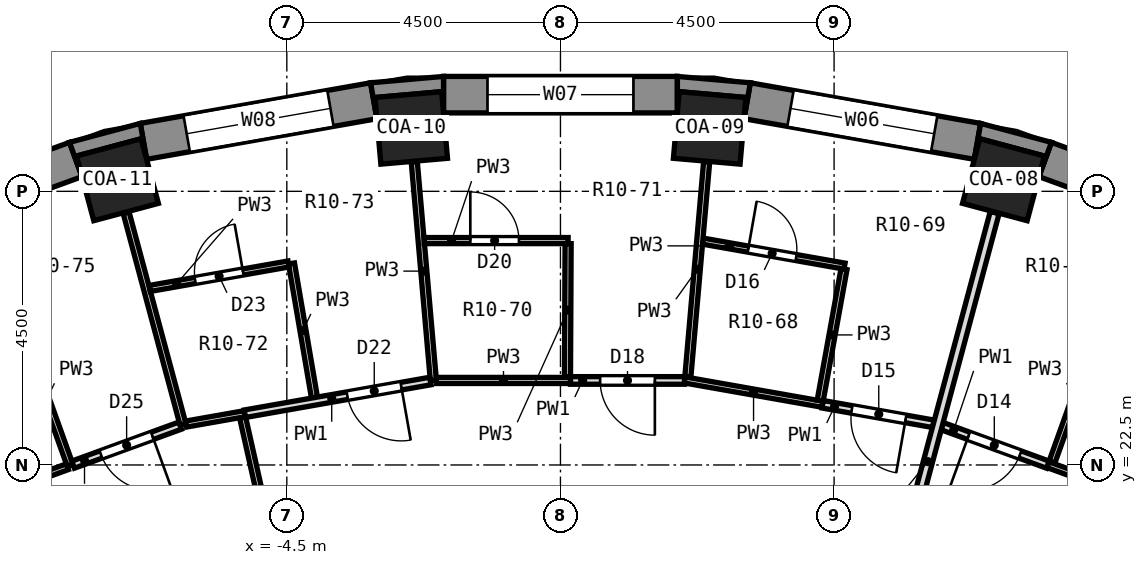
"""IFC4 building model, lengths in metres.
Left out: names, types, materials, properties, quantities, classifications, styles, units other than length and angle.
Written with IfcOpenShell. Run it as: python <this file> out.ifc"""

import sys

from ifc_helpers import new_model, si_unit, direction, frame, frame_2d, origin, origin_2d, place, context, subcontext, project, spatial, polyline, rectangle, outline, extrude, element, fill, save


model = new_model("IFC4")
c1 = context("Model", 3, precision=1e-05, world=origin(), true_north=direction((0.0, 1.0)))
c2 = subcontext(c1, "Body", "Model", "MODEL_VIEW")
j1 = project(units=[si_unit("LENGTHUNIT", "METRE"), si_unit("PLANEANGLEUNIT", "RADIAN")], contexts=[c1])
p1 = place(None, origin())
s1 = spatial("IfcSite", under=j1, at=p1, CompositionType="ELEMENT")
p2 = place(p1, origin())
s2 = spatial("IfcBuilding", under=s1, at=p2, CompositionType="ELEMENT")
p3 = place(p2, frame((0.0, 0.0, 36.2)))
s3 = spatial("IfcBuildingStorey", under=s2, at=p3, CompositionType="ELEMENT", Elevation=36.2)
for number, where, z_axis, x_axis in (
    (1, (7.286, 27.191, 0.0), (0.0, 0.0, 1.0), (0.259, 0.966, 0.0)),
    (2, (2.453, 28.043, 0.0), (0.0, 0.0, 1.0), (0.087, 0.996, 0.0)),
    (3, (-2.453, 28.043, 0.0), (0.0, 0.0, 1.0), (-0.087, 0.996, 0.0)),
    (4, (-7.286, 27.191, 0.0), (0.0, 0.0, 1.0), (-0.259, 0.966, 0.0)),
):
    element("IfcColumn", number, at=place(p3, frame(where, z_axis=z_axis, x_axis=x_axis)), inside=s3, PredefinedType="COLUMN", context=c2, shape_type="SweptSolid", body=[
        extrude(rectangle(XDim=1.1, YDim=1.1, at=origin_2d()), origin(), (0.0, 0.0, 1.0), 3.3),
    ])
p4 = place(p3, frame((11.585, 26.208, 0.0), z_axis=(0.0, 0.0, 1.0), x_axis=(-0.939689588564, 0.342028474173, 0.0)))
e5 = element("IfcWall", 5, at=p4, inside=s3, PredefinedType="SOLIDWALL", context=c2, shape_type="SweptSolid", body=[
    extrude(rectangle(XDim=3.846, YDim=0.6, at=frame_2d((1.923, 0.0))), origin(), (0.0, 0.0, 1.0), 2.75),
])
p5 = place(p4, frame((0.723, 0.0, 0.9)))
e6 = element("IfcOpeningElement", 6, at=p5, cuts=e5, PredefinedType="OPENING", context=c2, shape_type="SweptSolid", body=[
    extrude(rectangle(XDim=2.4, YDim=1.8, at=frame_2d((1.2, 0.9))), frame((0.0, 0.312, 0.0), z_axis=(0.0, -1.0, 0.0), x_axis=(1.0, 0.0, 0.0)), (0.0, 0.0, 1.0), 0.624),
])
p6 = place(p3, frame((6.858, 27.821, 0.0), z_axis=(0.0, 0.0, 1.0), x_axis=(-0.984800809218, 0.173687553279, 0.0)))
e7 = element("IfcWall", 7, at=p6, inside=s3, PredefinedType="SOLIDWALL", context=c2, shape_type="SweptSolid", body=[
    extrude(rectangle(XDim=3.846, YDim=0.6, at=frame_2d((1.923, 0.0))), origin(), (0.0, 0.0, 1.0), 2.75),
])
p7 = place(p6, frame((0.723, 0.0, 0.9)))
e8 = element("IfcOpeningElement", 8, at=p7, cuts=e7, PredefinedType="OPENING", context=c2, shape_type="SweptSolid", body=[
    extrude(rectangle(XDim=2.4, YDim=1.8, at=frame_2d((1.2, 0.9))), frame((0.0, 0.312, 0.0), z_axis=(0.0, -1.0, 0.0), x_axis=(1.0, 0.0, 0.0)), (0.0, 0.0, 1.0), 0.624),
])
p8 = place(p3, frame((1.923, 28.59, 0.0), z_axis=(0.0, 0.0, 1.0), x_axis=(-1.0, 0.0, 0.0)))
e9 = element("IfcWall", 9, at=p8, inside=s3, PredefinedType="SOLIDWALL", context=c2, shape_type="SweptSolid", body=[
    extrude(rectangle(XDim=3.846, YDim=0.6, at=frame_2d((1.923, 0.0))), origin(), (0.0, 0.0, 1.0), 2.75),
])
p9 = place(p8, frame((0.723, 0.0, 0.9)))
e10 = element("IfcOpeningElement", 10, at=p9, cuts=e9, PredefinedType="OPENING", context=c2, shape_type="SweptSolid", body=[
    extrude(rectangle(XDim=2.4, YDim=1.8, at=frame_2d((1.2, 0.9))), frame((0.0, 0.312, 0.0), z_axis=(0.0, -1.0, 0.0), x_axis=(1.0, 0.0, 0.0)), (0.0, 0.0, 1.0), 0.624),
])
p10 = place(p3, frame((-3.071, 28.489, 0.0), z_axis=(0.0, 0.0, 1.0), x_axis=(-0.984800809218, -0.173687553279, 0.0)))
e11 = element("IfcWall", 11, at=p10, inside=s3, PredefinedType="SOLIDWALL", context=c2, shape_type="SweptSolid", body=[
    extrude(rectangle(XDim=3.846, YDim=0.6, at=frame_2d((1.923, 0.0))), origin(), (0.0, 0.0, 1.0), 2.75),
])
p11 = place(p10, frame((0.723, 0.0, 0.9)))
e12 = element("IfcOpeningElement", 12, at=p11, cuts=e11, PredefinedType="OPENING", context=c2, shape_type="SweptSolid", body=[
    extrude(rectangle(XDim=2.4, YDim=1.8, at=frame_2d((1.2, 0.9))), frame((0.0, 0.312, 0.0), z_axis=(0.0, -1.0, 0.0), x_axis=(1.0, 0.0, 0.0)), (0.0, 0.0, 1.0), 0.624),
])
p12 = place(p3, frame((-7.971, 27.523, 0.0), z_axis=(0.0, 0.0, 1.0), x_axis=(-0.939689588564, -0.342028474173, 0.0)))
e13 = element("IfcWall", 13, at=p12, inside=s3, PredefinedType="SOLIDWALL", context=c2, shape_type="SweptSolid", body=[
    extrude(rectangle(XDim=3.846, YDim=0.6, at=frame_2d((1.923, 0.0))), origin(), (0.0, 0.0, 1.0), 2.75),
])
p13 = place(p12, frame((0.723, 0.0, 0.9)))
e14 = element("IfcOpeningElement", 14, at=p13, cuts=e13, PredefinedType="OPENING", context=c2, shape_type="SweptSolid", body=[
    extrude(rectangle(XDim=2.4, YDim=1.8, at=frame_2d((1.2, 0.9))), frame((0.0, 0.312, 0.0), z_axis=(0.0, -1.0, 0.0), x_axis=(1.0, 0.0, 0.0)), (0.0, 0.0, 1.0), 0.624),
])
p14 = place(p3, origin())
e15 = element("IfcWall", 15, at=p14, inside=s3, PredefinedType="SOLIDWALL", context=c2, shape_type="SweptSolid", body=[
    extrude(outline(polyline([(6.91, 28.117), (6.806, 27.526), (6.897, 27.865), (7.959, 27.58), (7.869, 27.241), (8.074, 27.805), (6.91, 28.117)])), origin(), (0.0, 0.0, 1.0), 2.75),
])
p15 = place(p3, origin())
e16 = element("IfcWall", 16, at=p15, inside=s3, PredefinedType="SOLIDWALL", context=c2, shape_type="SweptSolid", body=[
    extrude(outline(polyline([(3.123, 28.785), (1.923, 28.89), (1.923, 28.29), (1.954, 28.639), (3.049, 28.543), (3.019, 28.194), (3.123, 28.785)])), origin(), (0.0, 0.0, 1.0), 2.75),
])
p16 = place(p3, origin())
e17 = element("IfcWall", 17, at=p16, inside=s3, PredefinedType="SOLIDWALL", context=c2, shape_type="SweptSolid", body=[
    extrude(outline(polyline([(-1.923, 28.89), (-3.123, 28.785), (-3.019, 28.194), (-3.049, 28.543), (-1.954, 28.639), (-1.923, 28.29), (-1.923, 28.89)])), origin(), (0.0, 0.0, 1.0), 2.75),
])
p17 = place(p3, origin())
e18 = element("IfcWall", 18, at=p17, inside=s3, PredefinedType="SOLIDWALL", context=c2, shape_type="SweptSolid", body=[
    extrude(outline(polyline([(-6.91, 28.117), (-8.074, 27.805), (-7.869, 27.241), (-7.959, 27.58), (-6.897, 27.865), (-6.806, 27.526), (-6.91, 28.117)])), origin(), (0.0, 0.0, 1.0), 2.75),
])
p18 = place(p3, frame((-2.404, 27.485, 0.0), z_axis=(0.0, 0.0, 1.0), x_axis=(0.08706456859, -0.996202670593, 0.0)))
e19 = element("IfcWall", 19, at=p18, inside=s3, PredefinedType="PARTITIONING", context=c2, shape_type="SweptSolid", body=[
    extrude(rectangle(XDim=3.609, YDim=0.1, at=frame_2d((1.804, 0.0))), origin(), (0.0, 0.0, 1.0), 2.75),
])
p19 = place(p3, frame((-4.423, 25.814, 0.0), z_axis=(0.0, 0.0, 1.0), x_axis=(0.168697286213, -0.985667908387, 0.0)))
e20 = element("IfcWall", 20, at=p19, inside=s3, PredefinedType="PARTITIONING", context=c2, shape_type="SweptSolid", body=[
    extrude(rectangle(XDim=2.237, YDim=0.1, at=frame_2d((1.119, 0.0))), origin(), (0.0, 0.0, 1.0), 2.75),
])
p20 = place(p3, frame((-5.228, 23.285, 0.0), z_axis=(0.0, 0.0, 1.0), x_axis=(0.219089188196, -0.975704836319, 0.0)))
e21 = element("IfcWall", 21, at=p20, inside=s3, PredefinedType="PARTITIONING", context=c2, shape_type="SweptSolid", body=[
    extrude(rectangle(XDim=4.944, YDim=0.1, at=frame_2d((2.472, 0.0))), origin(), (0.0, 0.0, 1.0), 2.75),
])
p21 = place(p20, frame((2.028, 0.0, 0.0)))
e22 = element("IfcOpeningElement", 22, at=p21, cuts=e21, PredefinedType="OPENING", context=c2, shape_type="SweptSolid", body=[
    extrude(rectangle(XDim=0.9, YDim=2.1, at=frame_2d((0.45, 1.05))), frame((0.0, 0.062, 0.0), z_axis=(0.0, -1.0, 0.0), x_axis=(1.0, 0.0, 0.0)), (0.0, 0.0, 1.0), 0.124),
])
p22 = place(p3, frame((-7.143, 26.649, 0.0), z_axis=(0.0, 0.0, 1.0), x_axis=(0.259371754041, -0.965777558864, 0.0)))
e23 = element("IfcWall", 23, at=p22, inside=s3, PredefinedType="PARTITIONING", context=c2, shape_type="SweptSolid", body=[
    extrude(rectangle(XDim=3.609, YDim=0.1, at=frame_2d((1.804, 0.0))), origin(), (0.0, 0.0, 1.0), 2.75),
])
p23 = place(p3, frame((-8.839, 24.653, 0.0), z_axis=(0.0, 0.0, 1.0), x_axis=(0.337828591949, -0.941207651085, 0.0)))
e24 = element("IfcWall", 24, at=p23, inside=s3, PredefinedType="PARTITIONING", context=c2, shape_type="SweptSolid", body=[
    extrude(rectangle(XDim=2.3, YDim=0.1, at=frame_2d((1.15, 0.0))), origin(), (0.0, 0.0, 1.0), 2.75),
])
p24 = place(p3, frame((-11.659, 25.006, 0.0), z_axis=(0.0, 0.0, 1.0), x_axis=(0.422264101424, -0.906472850475, 0.0)))
e25 = element("IfcWall", 25, at=p24, inside=s3, PredefinedType="PARTITIONING", context=c2, shape_type="SweptSolid", body=[
    extrude(rectangle(XDim=9.057, YDim=0.15, at=frame_2d((4.529, 0.0))), origin(), (0.0, 0.0, 1.0), 2.75),
])
p25 = place(p3, frame((8.015, 22.505, 0.0), z_axis=(0.0, 0.0, 1.0), x_axis=(0.939744943051, -0.341876354856, 0.0)))
e26 = element("IfcWall", 26, at=p25, inside=s3, PredefinedType="PARTITIONING", context=c2, shape_type="SweptSolid", body=[
    extrude(rectangle(XDim=2.206, YDim=0.1, at=frame_2d((1.103, 0.0))), origin(), (0.0, 0.0, 1.0), 2.75),
])
p26 = place(p3, frame((6.278, 23.138, 0.0), z_axis=(0.0, 0.0, 1.0), x_axis=(0.939538772486, -0.34244254262, 0.0)))
e27 = element("IfcWall", 27, at=p26, inside=s3, PredefinedType="PARTITIONING", context=c2, shape_type="SweptSolid", body=[
    extrude(rectangle(XDim=1.849, YDim=0.125, at=frame_2d((0.925, 0.0))), origin(), (0.0, 0.0, 1.0), 2.75),
])
p27 = place(p26, frame((0.462, 0.0, 0.0)))
e28 = element("IfcOpeningElement", 28, at=p27, cuts=e27, PredefinedType="OPENING", context=c2, shape_type="SweptSolid", body=[
    extrude(rectangle(XDim=0.9, YDim=2.1, at=frame_2d((0.45, 1.05))), frame((0.0, 0.074, 0.0), z_axis=(0.0, -1.0, 0.0), x_axis=(1.0, 0.0, 0.0)), (0.0, 0.0, 1.0), 0.149),
])
p28 = place(p3, frame((2.04, 23.899, 0.0), z_axis=(0.0, 0.0, 1.0), x_axis=(0.984796344358, -0.173712866935, 0.0)))
e29 = element("IfcWall", 29, at=p28, inside=s3, PredefinedType="PARTITIONING", context=c2, shape_type="SweptSolid", body=[
    extrude(rectangle(XDim=2.306, YDim=0.1, at=frame_2d((1.153, 0.0))), origin(), (0.0, 0.0, 1.0), 2.75),
])
p29 = place(p3, frame((4.311, 23.498, 0.0), z_axis=(0.0, 0.0, 1.0), x_axis=(0.984802153769, -0.173679929558, 0.0)))
e30 = element("IfcWall", 30, at=p29, inside=s3, PredefinedType="PARTITIONING", context=c2, shape_type="SweptSolid", body=[
    extrude(rectangle(XDim=1.85, YDim=0.125, at=frame_2d((0.925, 0.0))), origin(), (0.0, 0.0, 1.0), 2.75),
])
p30 = place(p29, frame((0.488, 0.0, 0.0)))
e31 = element("IfcOpeningElement", 31, at=p30, cuts=e30, PredefinedType="OPENING", context=c2, shape_type="SweptSolid", body=[
    extrude(rectangle(XDim=0.9, YDim=2.1, at=frame_2d((0.45, 1.05))), frame((0.0, 0.074, 0.0), z_axis=(0.0, -1.0, 0.0), x_axis=(1.0, 0.0, 0.0)), (0.0, 0.0, 1.0), 0.149),
])
p31 = place(p3, frame((2.34, 26.181, 0.0), z_axis=(0.0, 0.0, 1.0), x_axis=(0.984791861756, -0.173738277359, 0.0)))
e32 = element("IfcWall", 32, at=p31, inside=s3, PredefinedType="PARTITIONING", context=c2, shape_type="SweptSolid", body=[
    extrude(rectangle(XDim=2.368, YDim=0.1, at=frame_2d((1.184, 0.0))), origin(), (0.0, 0.0, 1.0), 2.75),
])
p32 = place(p31, frame((0.759, 0.0, 0.0)))
e33 = element("IfcOpeningElement", 33, at=p32, cuts=e32, PredefinedType="OPENING", context=c2, shape_type="SweptSolid", body=[
    extrude(rectangle(XDim=0.8, YDim=2.1, at=frame_2d((0.4, 1.05))), frame((0.0, 0.062, 0.0), z_axis=(0.0, -1.0, 0.0), x_axis=(1.0, 0.0, 0.0)), (0.0, 0.0, 1.0), 0.124),
])
p33 = place(p3, frame((-2.04, 23.89, 0.0), z_axis=(0.0, 0.0, 1.0), x_axis=(1.0, 0.0, 0.0)))
e34 = element("IfcWall", 34, at=p33, inside=s3, PredefinedType="PARTITIONING", context=c2, shape_type="SweptSolid", body=[
    extrude(rectangle(XDim=2.205, YDim=0.1, at=frame_2d((1.103, 0.0))), origin(), (0.0, 0.0, 1.0), 2.75),
])
p34 = place(p3, frame((0.165, 23.89, 0.0), z_axis=(0.0, 0.0, 1.0), x_axis=(1.0, 0.0, 0.0)))
e35 = element("IfcWall", 35, at=p34, inside=s3, PredefinedType="PARTITIONING", context=c2, shape_type="SweptSolid", body=[
    extrude(rectangle(XDim=1.875, YDim=0.125, at=frame_2d((0.938, 0.0))), origin(), (0.0, 0.0, 1.0), 2.75),
])
p35 = place(p34, frame((0.488, 0.0, 0.0)))
e36 = element("IfcOpeningElement", 36, at=p35, cuts=e35, PredefinedType="OPENING", context=c2, shape_type="SweptSolid", body=[
    extrude(rectangle(XDim=0.9, YDim=2.1, at=frame_2d((0.45, 1.05))), frame((0.0, 0.074, 0.0), z_axis=(0.0, -1.0, 0.0), x_axis=(1.0, 0.0, 0.0)), (0.0, 0.0, 1.0), 0.149),
])
p36 = place(p3, frame((-2.241, 26.19, 0.0), z_axis=(0.0, 0.0, 1.0), x_axis=(1.0, 0.0, 0.0)))
e37 = element("IfcWall", 37, at=p36, inside=s3, PredefinedType="PARTITIONING", context=c2, shape_type="SweptSolid", body=[
    extrude(rectangle(XDim=2.367, YDim=0.1, at=frame_2d((1.184, 0.0))), origin(), (0.0, 0.0, 1.0), 2.75),
])
p37 = place(p36, frame((0.759, 0.0, 0.0)))
e38 = element("IfcOpeningElement", 38, at=p37, cuts=e37, PredefinedType="OPENING", context=c2, shape_type="SweptSolid", body=[
    extrude(rectangle(XDim=0.8, YDim=2.1, at=frame_2d((0.4, 1.05))), frame((0.0, 0.062, 0.0), z_axis=(0.0, -1.0, 0.0), x_axis=(1.0, 0.0, 0.0)), (0.0, 0.0, 1.0), 0.124),
])
p38 = place(p3, frame((-6.158, 23.173, 0.0), z_axis=(0.0, 0.0, 1.0), x_axis=(0.984806059991, 0.173657778994, 0.0)))
e39 = element("IfcWall", 39, at=p38, inside=s3, PredefinedType="PARTITIONING", context=c2, shape_type="SweptSolid", body=[
    extrude(rectangle(XDim=0.983, YDim=0.1, at=frame_2d((0.491, 0.0))), origin(), (0.0, 0.0, 1.0), 2.75),
])
p39 = place(p3, frame((-5.19, 23.343, 0.0), z_axis=(0.0, 0.0, 1.0), x_axis=(0.984810524367, 0.173632459798, 0.0)))
e40 = element("IfcWall", 40, at=p39, inside=s3, PredefinedType="PARTITIONING", context=c2, shape_type="SweptSolid", body=[
    extrude(rectangle(XDim=3.098, YDim=0.125, at=frame_2d((1.549, 0.0))), origin(), (0.0, 0.0, 1.0), 2.75),
])
p40 = place(p39, frame((1.71, 0.0, 0.0)))
e41 = element("IfcOpeningElement", 41, at=p40, cuts=e40, PredefinedType="OPENING", context=c2, shape_type="SweptSolid", body=[
    extrude(rectangle(XDim=0.9, YDim=2.1, at=frame_2d((0.45, 1.05))), frame((0.0, 0.074, 0.0), z_axis=(0.0, -1.0, 0.0), x_axis=(1.0, 0.0, 0.0)), (0.0, 0.0, 1.0), 0.149),
])
p41 = place(p3, frame((-6.755, 25.403, 0.0), z_axis=(0.0, 0.0, 1.0), x_axis=(0.984780377383, 0.173803361074, 0.0)))
e42 = element("IfcWall", 42, at=p41, inside=s3, PredefinedType="PARTITIONING", context=c2, shape_type="SweptSolid", body=[
    extrude(rectangle(XDim=2.318, YDim=0.1, at=frame_2d((1.159, 0.0))), origin(), (0.0, 0.0, 1.0), 2.75),
])
p42 = place(p41, frame((0.759, 0.0, 0.0)))
e43 = element("IfcOpeningElement", 43, at=p42, cuts=e42, PredefinedType="OPENING", context=c2, shape_type="SweptSolid", body=[
    extrude(rectangle(XDim=0.8, YDim=2.1, at=frame_2d((0.4, 1.05))), frame((0.0, 0.062, 0.0), z_axis=(0.0, -1.0, 0.0), x_axis=(1.0, 0.0, 0.0)), (0.0, 0.0, 1.0), 0.124),
])
p43 = place(p3, frame((-10.064, 21.76, 0.0), z_axis=(0.0, 0.0, 1.0), x_axis=(0.939769439446, 0.341809012, 0.0)))
e44 = element("IfcWall", 44, at=p43, inside=s3, PredefinedType="PARTITIONING", context=c2, shape_type="SweptSolid", body=[
    extrude(rectangle(XDim=2.081, YDim=0.1, at=frame_2d((1.04, 0.0))), origin(), (0.0, 0.0, 1.0), 2.75),
])
p44 = place(p3, frame((-8.015, 22.505, 0.0), z_axis=(0.0, 0.0, 1.0), x_axis=(0.939553626447, 0.342401785962, 0.0)))
e45 = element("IfcWall", 45, at=p44, inside=s3, PredefinedType="PARTITIONING", context=c2, shape_type="SweptSolid", body=[
    extrude(rectangle(XDim=1.875, YDim=0.125, at=frame_2d((0.937, 0.0))), origin(), (0.0, 0.0, 1.0), 2.75),
])
p45 = place(p44, frame((0.487, 0.0, 0.0)))
e46 = element("IfcOpeningElement", 46, at=p45, cuts=e45, PredefinedType="OPENING", context=c2, shape_type="SweptSolid", body=[
    extrude(rectangle(XDim=0.9, YDim=2.1, at=frame_2d((0.45, 1.05))), frame((0.0, 0.074, 0.0), z_axis=(0.0, -1.0, 0.0), x_axis=(1.0, 0.0, 0.0)), (0.0, 0.0, 1.0), 0.149),
])
p46 = place(p3, frame((7.835, 16.796, 0.0), z_axis=(0.0, 0.0, 1.0), x_axis=(0.422351185038, 0.906432279046, 0.0)))
e47 = element("IfcWall", 47, at=p46, inside=s3, PredefinedType="PARTITIONING", context=c2, shape_type="SweptSolid", body=[
    extrude(rectangle(XDim=9.057, YDim=0.1, at=frame_2d((4.528, 0.0))), origin(), (0.0, 0.0, 1.0), 2.75),
])
p47 = place(p46, frame((2.243, 0.0, 0.0)))
e48 = element("IfcOpeningElement", 48, at=p47, cuts=e47, PredefinedType="OPENING", context=c2, shape_type="SweptSolid", body=[
    extrude(rectangle(XDim=0.9, YDim=2.1, at=frame_2d((0.45, 1.05))), frame((0.0, 0.062, 0.0), z_axis=(0.0, -1.0, 0.0), x_axis=(1.0, 0.0, 0.0)), (0.0, 0.0, 1.0), 0.124),
])
p48 = place(p3, frame((8.083, 22.547, 0.0), z_axis=(0.0, 0.0, 1.0), x_axis=(0.337806451735, 0.9412155976, 0.0)))
e49 = element("IfcWall", 49, at=p48, inside=s3, PredefinedType="PARTITIONING", context=c2, shape_type="SweptSolid", body=[
    extrude(rectangle(XDim=2.188, YDim=0.1, at=frame_2d((1.094, 0.0))), origin(), (0.0, 0.0, 1.0), 2.75),
])
p49 = place(p3, frame((4.947, 18.46, 0.0), z_axis=(0.0, 0.0, 1.0), x_axis=(0.258782623342, 0.965935584734, 0.0)))
e50 = element("IfcWall", 50, at=p49, inside=s3, PredefinedType="PARTITIONING", context=c2, shape_type="SweptSolid", body=[
    extrude(rectangle(XDim=8.479, YDim=0.15, at=frame_2d((4.239, 0.0))), origin(), (0.0, 0.0, 1.0), 2.75),
])
p50 = place(p3, frame((4.271, 23.556, 0.0), z_axis=(0.0, 0.0, 1.0), x_axis=(0.178240802931, 0.983986898373, 0.0)))
e51 = element("IfcWall", 51, at=p50, inside=s3, PredefinedType="PARTITIONING", context=c2, shape_type="SweptSolid", body=[
    extrude(rectangle(XDim=2.2, YDim=0.1, at=frame_2d((1.1, 0.0))), origin(), (0.0, 0.0, 1.0), 2.75),
])
p51 = place(p3, frame((2.095, 23.952, 0.0), z_axis=(0.0, 0.0, 1.0), x_axis=(0.087084114239, 0.996200962179, 0.0)))
e52 = element("IfcWall", 52, at=p51, inside=s3, PredefinedType="PARTITIONING", context=c2, shape_type="SweptSolid", body=[
    extrude(rectangle(XDim=3.546, YDim=0.1, at=frame_2d((1.773, 0.0))), origin(), (0.0, 0.0, 1.0), 2.75),
])
p52 = place(p3, frame((0.115, 23.952, 0.0), z_axis=(0.0, 0.0, 1.0), x_axis=(0.004799051879, 0.999988484484, 0.0)))
e53 = element("IfcWall", 53, at=p52, inside=s3, PredefinedType="PARTITIONING", context=c2, shape_type="SweptSolid", body=[
    extrude(rectangle(XDim=2.188, YDim=0.1, at=frame_2d((1.094, 0.0))), origin(), (0.0, 0.0, 1.0), 2.75),
])
p53 = place(p7, origin())
e54 = element("IfcWindow", 54, at=p53, inside=s3, PartitioningType="SINGLE_PANEL", PredefinedType="WINDOW", context=c2, shape_type="SweptSolid", body=[
    extrude(rectangle(XDim=2.4, YDim=1.8, at=frame_2d((1.2, 0.9))), frame((0.0, 0.18, 0.0), z_axis=(0.0, -1.0, 0.0), x_axis=(1.0, 0.0, 0.0)), (0.0, 0.0, 1.0), 0.06),
])
fill(e8, e54)
p54 = place(p9, origin())
e55 = element("IfcWindow", 55, at=p54, inside=s3, PartitioningType="SINGLE_PANEL", PredefinedType="WINDOW", context=c2, shape_type="SweptSolid", body=[
    extrude(rectangle(XDim=2.4, YDim=1.8, at=frame_2d((1.2, 0.9))), frame((0.0, 0.18, 0.0), z_axis=(0.0, -1.0, 0.0), x_axis=(1.0, 0.0, 0.0)), (0.0, 0.0, 1.0), 0.06),
])
fill(e10, e55)
p55 = place(p11, origin())
e56 = element("IfcWindow", 56, at=p55, inside=s3, PartitioningType="SINGLE_PANEL", PredefinedType="WINDOW", context=c2, shape_type="SweptSolid", body=[
    extrude(rectangle(XDim=2.4, YDim=1.8, at=frame_2d((1.2, 0.9))), frame((0.0, 0.18, 0.0), z_axis=(0.0, -1.0, 0.0), x_axis=(1.0, 0.0, 0.0)), (0.0, 0.0, 1.0), 0.06),
])
fill(e12, e56)
p56 = place(p27, frame((0.9, 0.0, 0.0), z_axis=(0.0, 0.0, 1.0), x_axis=(-1.0, 0.0, 0.0)))
e57 = element("IfcDoor", 57, at=p56, inside=s3, OperationType="SINGLE_SWING_RIGHT", PredefinedType="DOOR", context=c2, shape_type="SweptSolid", body=[
    extrude(rectangle(XDim=0.9, YDim=2.1, at=frame_2d((0.45, 1.05))), frame((0.0, 0.025, 0.0), z_axis=(0.0, -1.0, 0.0), x_axis=(1.0, 0.0, 0.0)), (0.0, 0.0, 1.0), 0.05),
])
fill(e28, e57)
p57 = place(p30, frame((0.9, 0.0, 0.0), z_axis=(0.0, 0.0, 1.0), x_axis=(-1.0, 0.0, 0.0)))
e58 = element("IfcDoor", 58, at=p57, inside=s3, OperationType="SINGLE_SWING_LEFT", PredefinedType="DOOR", context=c2, shape_type="SweptSolid", body=[
    extrude(rectangle(XDim=0.9, YDim=2.1, at=frame_2d((0.45, 1.05))), frame((0.0, 0.025, 0.0), z_axis=(0.0, -1.0, 0.0), x_axis=(1.0, 0.0, 0.0)), (0.0, 0.0, 1.0), 0.05),
])
fill(e31, e58)
p58 = place(p32, origin())
e59 = element("IfcDoor", 59, at=p58, inside=s3, OperationType="SINGLE_SWING_LEFT", PredefinedType="DOOR", context=c2, shape_type="SweptSolid", body=[
    extrude(rectangle(XDim=0.8, YDim=2.1, at=frame_2d((0.4, 1.05))), frame((0.0, 0.025, 0.0), z_axis=(0.0, -1.0, 0.0), x_axis=(1.0, 0.0, 0.0)), (0.0, 0.0, 1.0), 0.05),
])
fill(e33, e59)
p59 = place(p35, frame((0.9, 0.0, 0.0), z_axis=(0.0, 0.0, 1.0), x_axis=(-1.0, 0.0, 0.0)))
e60 = element("IfcDoor", 60, at=p59, inside=s3, OperationType="SINGLE_SWING_LEFT", PredefinedType="DOOR", context=c2, shape_type="SweptSolid", body=[
    extrude(rectangle(XDim=0.9, YDim=2.1, at=frame_2d((0.45, 1.05))), frame((0.0, 0.025, 0.0), z_axis=(0.0, -1.0, 0.0), x_axis=(1.0, 0.0, 0.0)), (0.0, 0.0, 1.0), 0.05),
])
fill(e36, e60)
p60 = place(p37, origin())
e61 = element("IfcDoor", 61, at=p60, inside=s3, OperationType="SINGLE_SWING_LEFT", PredefinedType="DOOR", context=c2, shape_type="SweptSolid", body=[
    extrude(rectangle(XDim=0.8, YDim=2.1, at=frame_2d((0.4, 1.05))), frame((0.0, 0.025, 0.0), z_axis=(0.0, -1.0, 0.0), x_axis=(1.0, 0.0, 0.0)), (0.0, 0.0, 1.0), 0.05),
])
fill(e38, e61)
p61 = place(p40, frame((0.9, 0.0, 0.0), z_axis=(0.0, 0.0, 1.0), x_axis=(-1.0, 0.0, 0.0)))
e62 = element("IfcDoor", 62, at=p61, inside=s3, OperationType="SINGLE_SWING_LEFT", PredefinedType="DOOR", context=c2, shape_type="SweptSolid", body=[
    extrude(rectangle(XDim=0.9, YDim=2.1, at=frame_2d((0.45, 1.05))), frame((0.0, 0.025, 0.0), z_axis=(0.0, -1.0, 0.0), x_axis=(1.0, 0.0, 0.0)), (0.0, 0.0, 1.0), 0.05),
])
fill(e41, e62)
p62 = place(p42, origin())
e63 = element("IfcDoor", 63, at=p62, inside=s3, OperationType="SINGLE_SWING_RIGHT", PredefinedType="DOOR", context=c2, shape_type="SweptSolid", body=[
    extrude(rectangle(XDim=0.8, YDim=2.1, at=frame_2d((0.4, 1.05))), frame((0.0, 0.025, 0.0), z_axis=(0.0, -1.0, 0.0), x_axis=(1.0, 0.0, 0.0)), (0.0, 0.0, 1.0), 0.05),
])
fill(e43, e63)
p63 = place(p45, frame((0.9, 0.0, 0.0), z_axis=(0.0, 0.0, 1.0), x_axis=(-1.0, 0.0, 0.0)))
e64 = element("IfcDoor", 64, at=p63, inside=s3, OperationType="SINGLE_SWING_LEFT", PredefinedType="DOOR", context=c2, shape_type="SweptSolid", body=[
    extrude(rectangle(XDim=0.9, YDim=2.1, at=frame_2d((0.45, 1.05))), frame((0.0, 0.025, 0.0), z_axis=(0.0, -1.0, 0.0), x_axis=(1.0, 0.0, 0.0)), (0.0, 0.0, 1.0), 0.05),
])
fill(e46, e64)
save(model, sys.argv[1])
